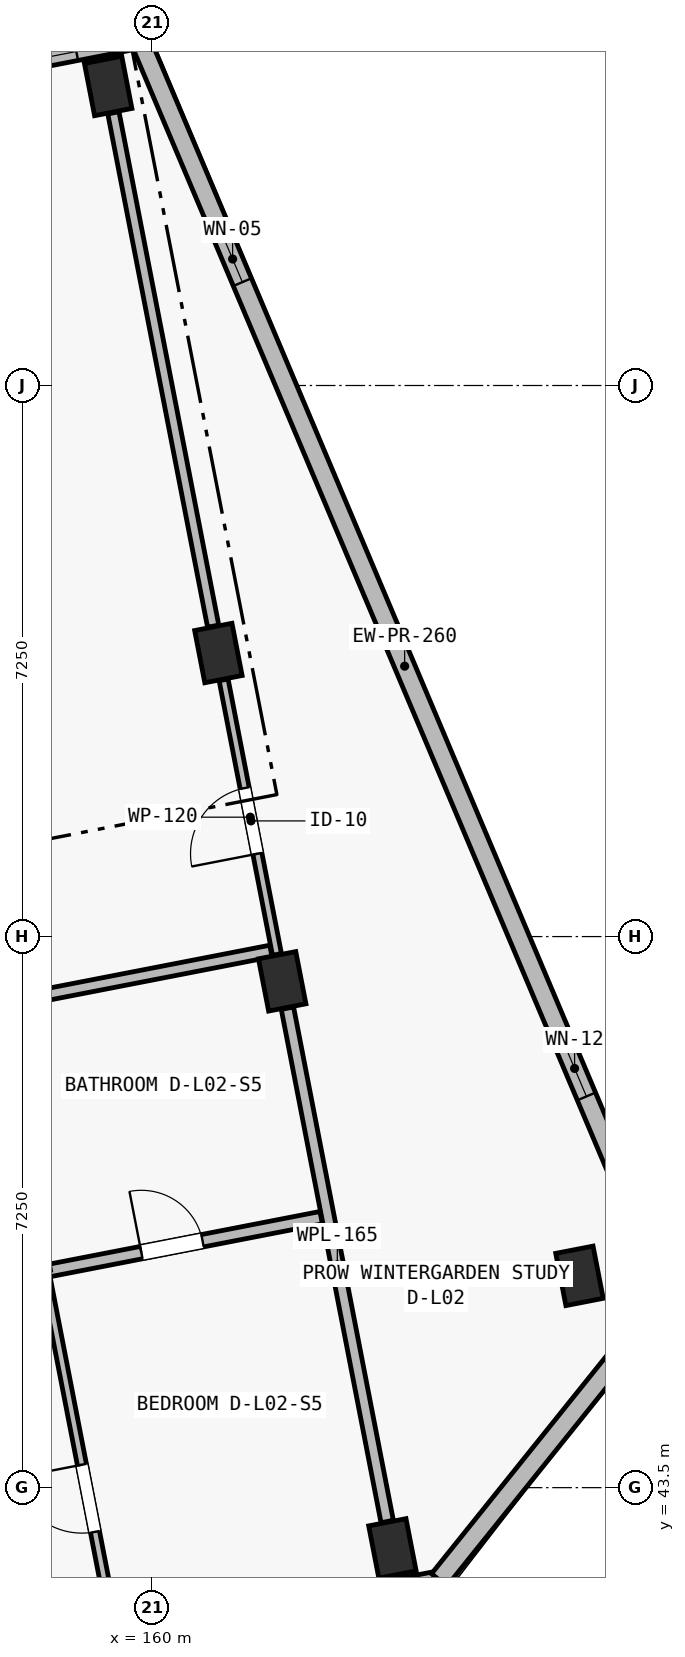
"""IFC4 building model, lengths in metres.
Left out: names, types, materials, properties, quantities, classifications, styles, units other than length and angle.
Written with IfcOpenShell. Run it as: python <this file> out.ifc"""

import sys

from ifc_helpers import new_model, si_unit, direction, frame, frame_2d, origin, origin_2d, place, context, subcontext, project, spatial, rectangle, extrude, element, fill, save


model = new_model("IFC4")
c1 = context("Model", 3, precision=1e-05, world=origin(), true_north=direction((0.0, 1.0)))
c2 = subcontext(c1, "Body", "Model", "MODEL_VIEW")
j1 = project(units=[si_unit("LENGTHUNIT", "METRE"), si_unit("PLANEANGLEUNIT", "RADIAN")], contexts=[c1])
p1 = place(None, origin())
s1 = spatial("IfcSite", under=j1, at=p1, CompositionType="ELEMENT")
p2 = place(p1, origin())
s2 = spatial("IfcBuilding", under=s1, at=p2, CompositionType="ELEMENT")
p3 = place(p2, frame((0.0, 0.0, 8.4)))
s3 = spatial("IfcBuildingStorey", under=s2, at=p3, CompositionType="ELEMENT", Elevation=8.4)
for number, where, z_axis, x_axis in (
    (1, (163.162, 42.701, 0.0), (0.0, 0.0, 1.0), (0.982, 0.191, 0.0)),
    (2, (161.712, 50.161, 0.0), (0.0, 0.0, 1.0), (0.982, 0.191, 0.0)),
    (3, (160.873, 54.48, 0.0), (0.0, 0.0, 1.0), (0.982, 0.191, 0.0)),
    (4, (159.422, 61.941, 0.0), (0.0, 0.0, 1.0), (0.982, 0.191, 0.0)),
    (5, (165.623, 46.286, 0.0), (0.0, 0.0, 1.0), (0.982, 0.191, 0.0)),
):
    element("IfcColumn", number, at=place(p3, frame(where, z_axis=z_axis, x_axis=x_axis)), inside=s3, PredefinedType="COLUMN", context=c2, shape_type="SweptSolid", body=[
        extrude(rectangle(XDim=0.5, YDim=0.7, at=origin_2d()), origin(), (0.0, 0.0, 1.0), 3.25),
    ])
p4 = place(p3, frame((163.778, 42.286, 0.0), z_axis=(0.0, 0.0, 1.0), x_axis=(-0.981628367112, -0.190802905848, 0.0)))
e6 = element("IfcWall", 6, at=p4, inside=s3, PredefinedType="SOLIDWALL", context=c2, shape_type="SweptSolid", body=[
    extrude(rectangle(XDim=8.125, YDim=0.24, at=frame_2d((4.062, 0.0))), origin(), (0.0, 0.0, 1.0), 3.0),
])
p5 = place(p4, frame((1.135, 0.0, 0.48)))
e7 = element("IfcOpeningElement", 7, at=p5, cuts=e6, PredefinedType="OPENING", context=c2, shape_type="SweptSolid", body=[
    extrude(rectangle(XDim=0.62, YDim=2.28, at=frame_2d((0.31, 1.14))), frame((0.0, 0.135, 0.0), z_axis=(0.0, -1.0, 0.0), x_axis=(1.0, 0.0, 0.0)), (0.0, 0.0, 1.0), 0.27),
])
p6 = place(p4, frame((2.637, 0.0, 0.52)))
e8 = element("IfcOpeningElement", 8, at=p6, cuts=e6, PredefinedType="OPENING", context=c2, shape_type="SweptSolid", body=[
    extrude(rectangle(XDim=0.64, YDim=2.18, at=frame_2d((0.32, 1.09))), frame((0.0, 0.135, 0.0), z_axis=(0.0, -1.0, 0.0), x_axis=(1.0, 0.0, 0.0)), (0.0, 0.0, 1.0), 0.27),
])
p7 = place(p4, frame((5.598, 0.0, 0.48)))
e9 = element("IfcOpeningElement", 9, at=p7, cuts=e6, PredefinedType="OPENING", context=c2, shape_type="SweptSolid", body=[
    extrude(rectangle(XDim=0.68, YDim=2.24, at=frame_2d((0.34, 1.12))), frame((0.0, 0.135, 0.0), z_axis=(0.0, -1.0, 0.0), x_axis=(1.0, 0.0, 0.0)), (0.0, 0.0, 1.0), 0.27),
])
p8 = place(p3, frame((151.862, 61.006, 0.0), z_axis=(0.0, 0.0, 1.0), x_axis=(0.981627273155, 0.190808533872, 0.0)))
e10 = element("IfcWall", 10, at=p8, inside=s3, PredefinedType="SOLIDWALL", context=c2, shape_type="SweptSolid", body=[
    extrude(rectangle(XDim=8.125, YDim=0.24, at=frame_2d((4.062, 0.0))), origin(), (0.0, 0.0, 1.0), 3.0),
])
p9 = place(p8, frame((6.525, 0.0, 0.45)))
e11 = element("IfcOpeningElement", 11, at=p9, cuts=e10, PredefinedType="OPENING", context=c2, shape_type="SweptSolid", body=[
    extrude(rectangle(XDim=0.75, YDim=2.32, at=frame_2d((0.375, 1.16))), frame((0.0, 0.135, 0.0), z_axis=(0.0, -1.0, 0.0), x_axis=(1.0, 0.0, 0.0)), (0.0, 0.0, 1.0), 0.27),
])
p10 = place(p3, frame((159.837, 62.556, 0.0), z_axis=(0.0, 0.0, 1.0), x_axis=(0.389225507936, -0.921142499276, 0.0)))
e12 = element("IfcWall", 12, at=p10, inside=s3, PredefinedType="SOLIDWALL", context=c2, shape_type="SweptSolid", body=[
    extrude(rectangle(XDim=17.91, YDim=0.26, at=frame_2d((8.955, 0.0))), origin(), (0.0, 0.0, 1.0), 3.0),
])
p11 = place(p10, frame((2.81, 0.0, 0.45)))
e13 = element("IfcOpeningElement", 13, at=p11, cuts=e12, PredefinedType="OPENING", context=c2, shape_type="SweptSolid", body=[
    extrude(rectangle(XDim=0.66, YDim=2.32, at=frame_2d((0.33, 1.16))), frame((0.0, 0.145, 0.0), z_axis=(0.0, -1.0, 0.0), x_axis=(1.0, 0.0, 0.0)), (0.0, 0.0, 1.0), 0.29),
])
p12 = place(p10, frame((14.3, 0.0, 0.52)))
e14 = element("IfcOpeningElement", 14, at=p12, cuts=e12, PredefinedType="OPENING", context=c2, shape_type="SweptSolid", body=[
    extrude(rectangle(XDim=0.8, YDim=2.3, at=frame_2d((0.4, 1.15))), frame((0.0, 0.145, 0.0), z_axis=(0.0, -1.0, 0.0), x_axis=(1.0, 0.0, 0.0)), (0.0, 0.0, 1.0), 0.29),
])
p13 = place(p3, frame((166.809, 46.058, 0.0), z_axis=(0.0, 0.0, 1.0), x_axis=(-0.626281072923, -0.779597343312, 0.0)))
e15 = element("IfcWall", 15, at=p13, inside=s3, PredefinedType="SOLIDWALL", context=c2, shape_type="SweptSolid", body=[
    extrude(rectangle(XDim=4.839, YDim=0.26, at=frame_2d((2.42, 0.0))), origin(), (0.0, 0.0, 1.0), 3.0),
])
p14 = place(p3, frame((161.643, 50.515, 0.0), z_axis=(0.0, 0.0, 1.0), x_axis=(-0.190805731561, 0.981627817864, 0.0)))
e16 = element("IfcWall", 16, at=p14, inside=s3, PredefinedType="PARTITIONING", context=c2, shape_type="SweptSolid", body=[
    extrude(rectangle(XDim=3.68, YDim=0.12, at=frame_2d((1.84, 0.0))), origin(), (0.0, 0.0, 1.0), 2.5),
])
p15 = place(p14, frame((1.35, 0.0, 0.0)))
e17 = element("IfcOpeningElement", 17, at=p15, cuts=e16, PredefinedType="OPENING", context=c2, shape_type="SweptSolid", body=[
    extrude(rectangle(XDim=0.88, YDim=2.1, at=frame_2d((0.44, 1.05))), frame((0.0, 0.075, 0.0), z_axis=(0.0, -1.0, 0.0), x_axis=(1.0, 0.0, 0.0)), (0.0, 0.0, 1.0), 0.15),
])
p16 = place(p3, frame((160.804, 54.834, 0.0), z_axis=(0.0, 0.0, 1.0), x_axis=(-0.190804123115, 0.981628130507, 0.0)))
e18 = element("IfcWall", 18, at=p16, inside=s3, PredefinedType="PARTITIONING", context=c2, shape_type="SweptSolid", body=[
    extrude(rectangle(XDim=6.88, YDim=0.15, at=frame_2d((3.44, 0.0))), origin(), (0.0, 0.0, 1.0), 2.5),
])
p17 = place(p3, frame((163.094, 43.054, 0.0), z_axis=(0.0, 0.0, 1.0), x_axis=(-0.190804123115, 0.981628130507, 0.0)))
e19 = element("IfcWall", 19, at=p17, inside=s3, PredefinedType="PLUMBINGWALL", context=c2, shape_type="SweptSolid", body=[
    extrude(rectangle(XDim=6.88, YDim=0.165, at=frame_2d((3.44, 0.0))), origin(), (0.0, 0.0, 1.0), 2.5),
])
p18 = place(p3, frame((154.427, 49.173, 0.0), z_axis=(0.0, 0.0, 1.0), x_axis=(0.981626748283, 0.190811234092, 0.0)))
e20 = element("IfcWall", 20, at=p18, inside=s3, PredefinedType="PARTITIONING", context=c2, shape_type="SweptSolid", body=[
    extrude(rectangle(XDim=7.27, YDim=0.155, at=frame_2d((3.635, 0.0))), origin(), (0.0, 0.0, 1.0), 2.97),
])
p19 = place(p18, frame((1.33, 0.0, 0.0)))
e21 = element("IfcOpeningElement", 21, at=p19, cuts=e20, PredefinedType="OPENING", context=c2, shape_type="SweptSolid", body=[
    extrude(rectangle(XDim=0.98, YDim=2.15, at=frame_2d((0.49, 1.075))), frame((0.0, 0.093, 0.0), z_axis=(0.0, -1.0, 0.0), x_axis=(1.0, 0.0, 0.0)), (0.0, 0.0, 1.0), 0.185),
])
p20 = place(p3, frame((158.583, 46.344, 0.0), z_axis=(0.0, 0.0, 1.0), x_axis=(0.981621896267, 0.190836193549, 0.0)))
e22 = element("IfcWall", 22, at=p20, inside=s3, PredefinedType="PLUMBINGWALL", context=c2, shape_type="SweptSolid", body=[
    extrude(rectangle(XDim=3.71, YDim=0.165, at=frame_2d((1.855, 0.0))), origin(), (0.0, 0.0, 1.0), 2.97),
])
p21 = place(p20, frame((1.3, 0.0, 0.0)))
e23 = element("IfcOpeningElement", 23, at=p21, cuts=e22, PredefinedType="OPENING", context=c2, shape_type="SweptSolid", body=[
    extrude(rectangle(XDim=0.82, YDim=2.08, at=frame_2d((0.41, 1.04))), frame((0.0, 0.097, 0.0), z_axis=(0.0, -1.0, 0.0), x_axis=(1.0, 0.0, 0.0)), (0.0, 0.0, 1.0), 0.195),
])
p22 = place(p3, frame((159.506, 41.593, 0.0), z_axis=(0.0, 0.0, 1.0), x_axis=(-0.190777847092, 0.981633237548, 0.0)))
e24 = element("IfcWall", 24, at=p22, inside=s3, PredefinedType="PARTITIONING", context=c2, shape_type="SweptSolid", body=[
    extrude(rectangle(XDim=4.84, YDim=0.12, at=frame_2d((2.42, 0.0))), origin(), (0.0, 0.0, 1.0), 2.97),
])
p23 = place(p22, frame((1.35, 0.0, 0.0)))
e25 = element("IfcOpeningElement", 25, at=p23, cuts=e24, PredefinedType="OPENING", context=c2, shape_type="SweptSolid", body=[
    extrude(rectangle(XDim=0.9, YDim=2.1, at=frame_2d((0.45, 1.05))), frame((0.0, 0.075, 0.0), z_axis=(0.0, -1.0, 0.0), x_axis=(1.0, 0.0, 0.0)), (0.0, 0.0, 1.0), 0.15),
])
p24 = place(p9, origin())
e26 = element("IfcWindow", 26, at=p24, inside=s3, PartitioningType="SINGLE_PANEL", PredefinedType="WINDOW", context=c2, shape_type="SweptSolid", body=[
    extrude(rectangle(XDim=0.75, YDim=2.32, at=frame_2d((0.375, 1.16))), frame((0.0, 0.03, 0.0), z_axis=(0.0, -1.0, 0.0), x_axis=(1.0, 0.0, 0.0)), (0.0, 0.0, 1.0), 0.06),
])
fill(e11, e26)
p25 = place(p11, origin())
e27 = element("IfcWindow", 27, at=p25, inside=s3, PartitioningType="SINGLE_PANEL", PredefinedType="WINDOW", context=c2, shape_type="SweptSolid", body=[
    extrude(rectangle(XDim=0.66, YDim=2.32, at=frame_2d((0.33, 1.16))), frame((0.0, 0.03, 0.0), z_axis=(0.0, -1.0, 0.0), x_axis=(1.0, 0.0, 0.0)), (0.0, 0.0, 1.0), 0.06),
])
fill(e13, e27)
p26 = place(p12, origin())
e28 = element("IfcWindow", 28, at=p26, inside=s3, PartitioningType="SINGLE_PANEL", PredefinedType="WINDOW", context=c2, shape_type="SweptSolid", body=[
    extrude(rectangle(XDim=0.8, YDim=2.3, at=frame_2d((0.4, 1.15))), frame((0.0, 0.03, 0.0), z_axis=(0.0, -1.0, 0.0), x_axis=(1.0, 0.0, 0.0)), (0.0, 0.0, 1.0), 0.06),
])
fill(e14, e28)
p27 = place(p15, origin())
e29 = element("IfcDoor", 29, at=p27, inside=s3, OperationType="SINGLE_SWING_LEFT", PredefinedType="DOOR", context=c2, shape_type="SweptSolid", body=[
    extrude(rectangle(XDim=0.88, YDim=2.1, at=frame_2d((0.44, 1.05))), frame((0.0, 0.025, 0.0), z_axis=(0.0, -1.0, 0.0), x_axis=(1.0, 0.0, 0.0)), (0.0, 0.0, 1.0), 0.05),
])
fill(e17, e29)
p28 = place(p21, origin())
e30 = element("IfcDoor", 30, at=p28, inside=s3, OperationType="SINGLE_SWING_LEFT", PredefinedType="DOOR", context=c2, shape_type="SweptSolid", body=[
    extrude(rectangle(XDim=0.82, YDim=2.08, at=frame_2d((0.41, 1.04))), frame((0.0, 0.025, 0.0), z_axis=(0.0, -1.0, 0.0), x_axis=(1.0, 0.0, 0.0)), (0.0, 0.0, 1.0), 0.05),
])
fill(e23, e30)
p29 = place(p23, origin())
e31 = element("IfcDoor", 31, at=p29, inside=s3, OperationType="SINGLE_SWING_RIGHT", PredefinedType="DOOR", context=c2, shape_type="SweptSolid", body=[
    extrude(rectangle(XDim=0.9, YDim=2.1, at=frame_2d((0.45, 1.05))), frame((0.0, 0.025, 0.0), z_axis=(0.0, -1.0, 0.0), x_axis=(1.0, 0.0, 0.0)), (0.0, 0.0, 1.0), 0.05),
])
fill(e25, e31)
save(model, sys.argv[1])
